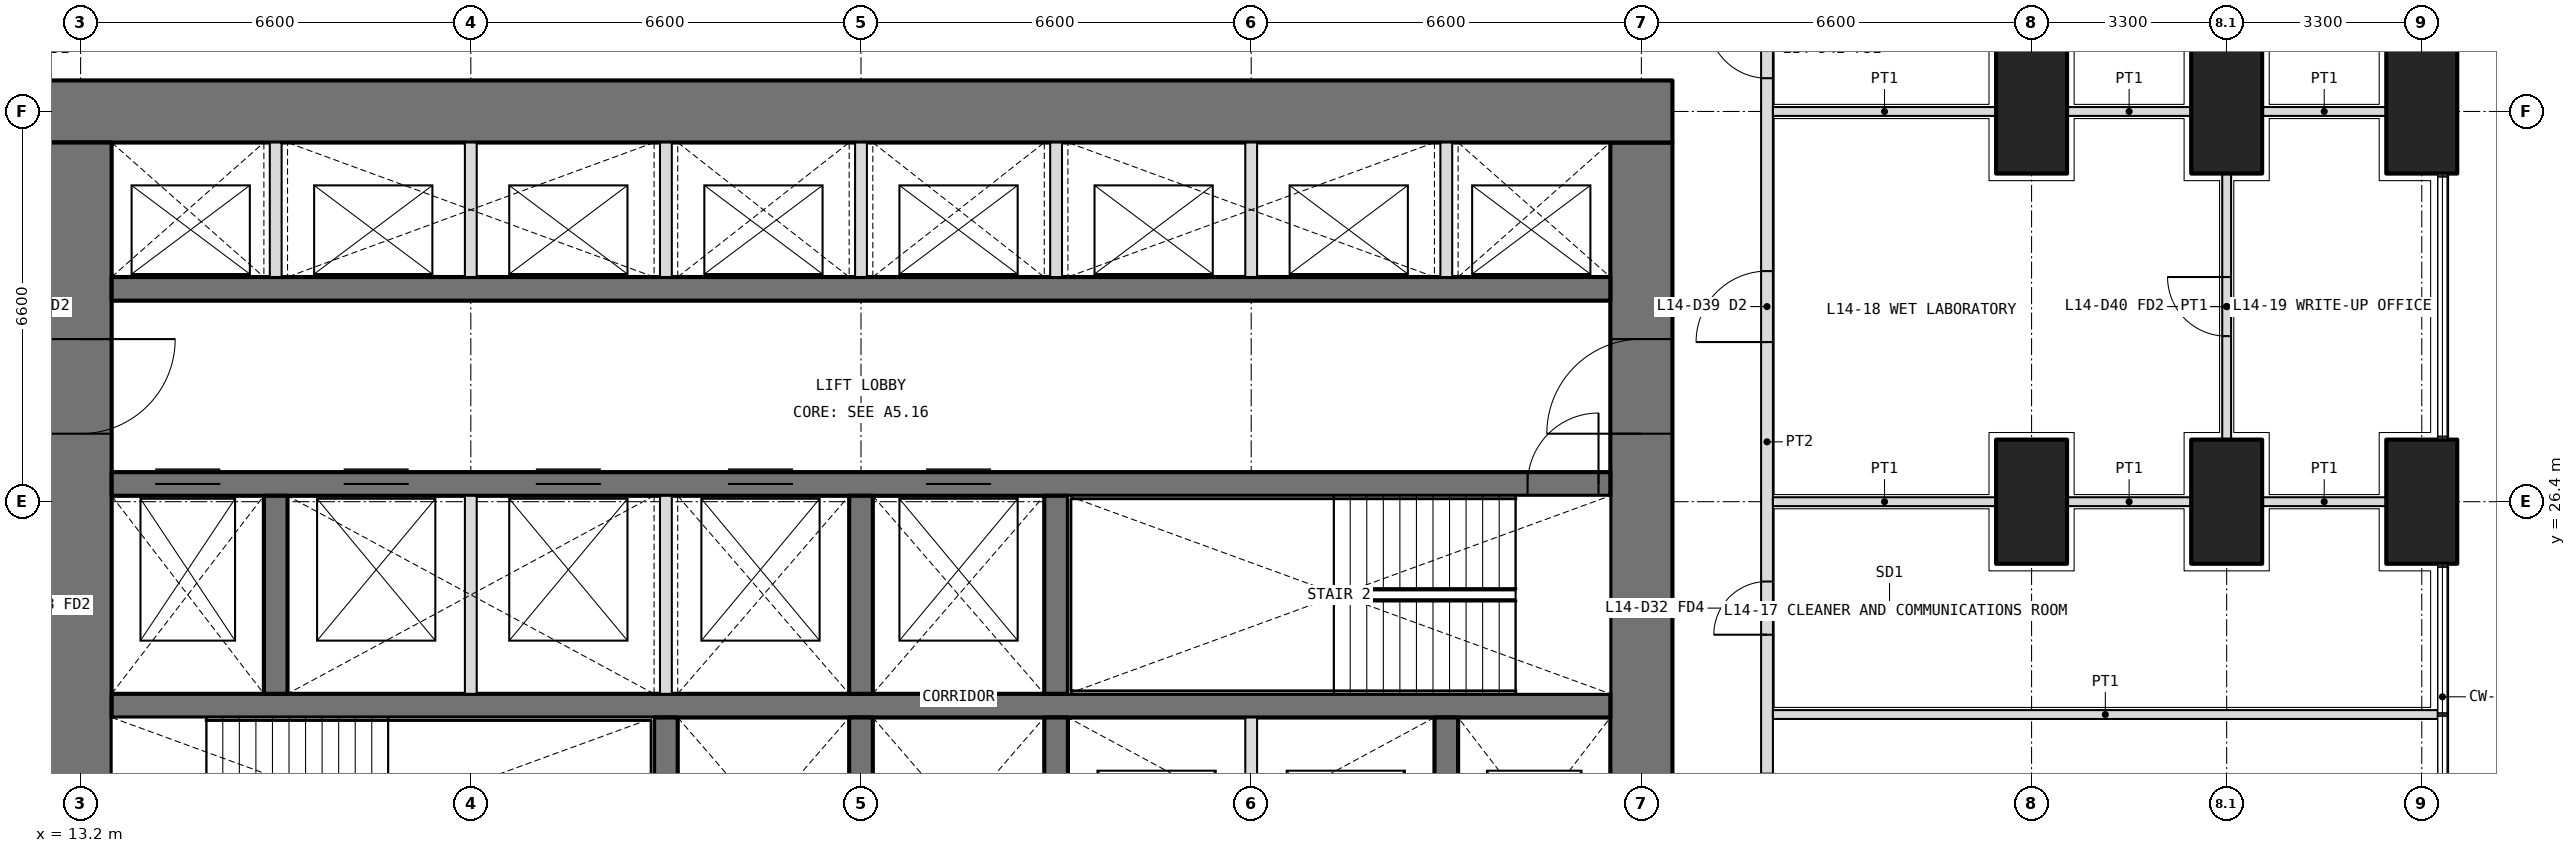
"""IFC4 building model, lengths in metres.
Left out: names, types, materials, properties, quantities, classifications, styles, units other than length and angle.
Written with IfcOpenShell. Run it as: python <this file> out.ifc"""

import sys

from ifc_helpers import new_model, si_unit, direction, frame, frame_2d, origin, origin_2d, place, context, subcontext, project, spatial, rectangle, extrude, element, fill, save


model = new_model("IFC4")
c1 = context("Model", 3, precision=1e-05, world=origin(), true_north=direction((0.0, 1.0)))
c2 = subcontext(c1, "Body", "Model", "MODEL_VIEW")
j1 = project(units=[si_unit("LENGTHUNIT", "METRE"), si_unit("PLANEANGLEUNIT", "RADIAN")], contexts=[c1])
p1 = place(None, origin())
s1 = spatial("IfcSite", under=j1, at=p1, CompositionType="ELEMENT")
p2 = place(p1, origin())
s2 = spatial("IfcBuilding", under=s1, at=p2, CompositionType="ELEMENT")
p3 = place(p2, frame((0.0, 0.0, 63.3)))
s3 = spatial("IfcBuildingStorey", under=s2, at=p3, CompositionType="ELEMENT", Elevation=63.3)
for number, where, z_axis, x_axis in (
    (1, (52.8, 26.4, 0.0), (0.0, 0.0, 1.0), (0.0, 1.0, 0.0)),
    (2, (52.8, 33.0, 0.0), (0.0, 0.0, 1.0), (0.0, 1.0, 0.0)),
    (3, (49.5, 26.4, 0.0), (0.0, 0.0, 1.0), (0.0, 1.0, 0.0)),
    (4, (49.5, 33.0, 0.0), (0.0, 0.0, 1.0), (0.0, 1.0, 0.0)),
    (5, (46.2, 26.4, 0.0), (0.0, 0.0, 1.0), (0.0, 1.0, 0.0)),
    (6, (46.2, 33.0, 0.0), (0.0, 0.0, 1.0), (0.0, 1.0, 0.0)),
):
    element("IfcColumn", number, at=place(p3, frame(where, z_axis=z_axis, x_axis=x_axis)), inside=s3, PredefinedType="COLUMN", context=c2, shape_type="SweptSolid", body=[
        extrude(rectangle(XDim=2.1, YDim=1.2, at=origin_2d()), origin(), (0.0, 0.0, 1.0), 4.2),
    ])
p4 = place(p3, frame((39.6, 13.725, 0.0), z_axis=(0.0, 0.0, 1.0), x_axis=(0.0, 1.0, 0.0)))
e7 = element("IfcWall", 7, at=p4, inside=s3, PredefinedType="SHEAR", context=c2, shape_type="SweptSolid", body=[
    extrude(rectangle(XDim=18.75, YDim=1.05, at=frame_2d((9.375, 0.0))), origin(), (0.0, 0.0, 1.0), 4.2),
])
p5 = place(p4, frame((3.025, 0.0, 0.0)))
e8 = element("IfcOpeningElement", 8, at=p5, cuts=e7, PredefinedType="OPENING", context=c2, shape_type="SweptSolid", body=[
    extrude(rectangle(XDim=1.6, YDim=2.1, at=frame_2d((0.8, 1.05))), frame((0.0, 0.535, 0.0), z_axis=(0.0, -1.0, 0.0), x_axis=(1.0, 0.0, 0.0)), (0.0, 0.0, 1.0), 1.07),
])
p6 = place(p4, frame((13.825, 0.0, 0.0)))
e9 = element("IfcOpeningElement", 9, at=p6, cuts=e7, PredefinedType="OPENING", context=c2, shape_type="SweptSolid", body=[
    extrude(rectangle(XDim=1.6, YDim=2.1, at=frame_2d((0.8, 1.05))), frame((0.0, 0.535, 0.0), z_axis=(0.0, -1.0, 0.0), x_axis=(1.0, 0.0, 0.0)), (0.0, 0.0, 1.0), 1.07),
])
p7 = place(p3, frame((40.125, 33.0, 0.0), z_axis=(0.0, 0.0, 1.0), x_axis=(-1.0, 0.0, 0.0)))
e10 = element("IfcWall", 10, at=p7, inside=s3, PredefinedType="SHEAR", context=c2, shape_type="SweptSolid", body=[
    extrude(rectangle(XDim=27.45, YDim=1.05, at=frame_2d((13.725, 0.0))), origin(), (0.0, 0.0, 1.0), 4.2),
])
p8 = place(p3, frame((13.2, 32.475, 0.0), z_axis=(0.0, 0.0, 1.0), x_axis=(0.0, -1.0, 0.0)))
e11 = element("IfcWall", 11, at=p8, inside=s3, PredefinedType="SHEAR", context=c2, shape_type="SweptSolid", body=[
    extrude(rectangle(XDim=18.75, YDim=1.05, at=frame_2d((9.375, 0.0))), origin(), (0.0, 0.0, 1.0), 4.2),
])
p9 = place(p8, frame((14.125, 0.0, 0.0)))
e12 = element("IfcOpeningElement", 12, at=p9, cuts=e11, PredefinedType="OPENING", context=c2, shape_type="SweptSolid", body=[
    extrude(rectangle(XDim=1.6, YDim=2.1, at=frame_2d((0.8, 1.05))), frame((0.0, 0.535, 0.0), z_axis=(0.0, -1.0, 0.0), x_axis=(1.0, 0.0, 0.0)), (0.0, 0.0, 1.0), 1.07),
])
p10 = place(p8, frame((3.325, 0.0, 0.0)))
e13 = element("IfcOpeningElement", 13, at=p10, cuts=e11, PredefinedType="OPENING", context=c2, shape_type="SweptSolid", body=[
    extrude(rectangle(XDim=1.6, YDim=2.1, at=frame_2d((0.8, 1.05))), frame((0.0, 0.535, 0.0), z_axis=(0.0, -1.0, 0.0), x_axis=(1.0, 0.0, 0.0)), (0.0, 0.0, 1.0), 1.07),
])
p11 = place(p3, frame((13.725, 22.95, 0.0), z_axis=(0.0, 0.0, 1.0), x_axis=(1.0, 0.0, 0.0)))
e14 = element("IfcWall", 14, at=p11, inside=s3, PredefinedType="SHEAR", context=c2, shape_type="SweptSolid", body=[
    extrude(rectangle(XDim=25.35, YDim=0.4, at=frame_2d((12.675, 0.0))), origin(), (0.0, 0.0, 1.0), 4.2),
])
p12 = place(p3, frame((13.725, 26.7, 0.0), z_axis=(0.0, 0.0, 1.0), x_axis=(1.0, 0.0, 0.0)))
e15 = element("IfcWall", 15, at=p12, inside=s3, PredefinedType="SHEAR", context=c2, shape_type="SweptSolid", body=[
    extrude(rectangle(XDim=25.35, YDim=0.4, at=frame_2d((12.675, 0.0))), origin(), (0.0, 0.0, 1.0), 4.2),
])
p13 = place(p12, frame((23.95, 0.0, 0.0)))
e16 = element("IfcOpeningElement", 16, at=p13, cuts=e15, PredefinedType="OPENING", context=c2, shape_type="SweptSolid", body=[
    extrude(rectangle(XDim=1.2, YDim=2.1, at=frame_2d((0.6, 1.05))), frame((0.0, 0.21, 0.0), z_axis=(0.0, -1.0, 0.0), x_axis=(1.0, 0.0, 0.0)), (0.0, 0.0, 1.0), 0.42),
])
p14 = place(p12, frame((0.738, 0.0, 0.0)))
e17 = element("IfcOpeningElement", 17, at=p14, cuts=e15, PredefinedType="OPENING", context=c2, shape_type="SweptSolid", body=[
    extrude(rectangle(XDim=1.1, YDim=2.1, at=frame_2d((0.55, 1.05))), frame((0.0, 0.21, 0.0), z_axis=(0.0, -1.0, 0.0), x_axis=(1.0, 0.0, 0.0)), (0.0, 0.0, 1.0), 0.42),
])
p15 = place(p12, frame((3.925, 0.0, 0.0)))
e18 = element("IfcOpeningElement", 18, at=p15, cuts=e15, PredefinedType="OPENING", context=c2, shape_type="SweptSolid", body=[
    extrude(rectangle(XDim=1.1, YDim=2.1, at=frame_2d((0.55, 1.05))), frame((0.0, 0.21, 0.0), z_axis=(0.0, -1.0, 0.0), x_axis=(1.0, 0.0, 0.0)), (0.0, 0.0, 1.0), 0.42),
])
p16 = place(p12, frame((7.175, 0.0, 0.0)))
e19 = element("IfcOpeningElement", 19, at=p16, cuts=e15, PredefinedType="OPENING", context=c2, shape_type="SweptSolid", body=[
    extrude(rectangle(XDim=1.1, YDim=2.1, at=frame_2d((0.55, 1.05))), frame((0.0, 0.21, 0.0), z_axis=(0.0, -1.0, 0.0), x_axis=(1.0, 0.0, 0.0)), (0.0, 0.0, 1.0), 0.42),
])
p17 = place(p12, frame((10.425, 0.0, 0.0)))
e20 = element("IfcOpeningElement", 20, at=p17, cuts=e15, PredefinedType="OPENING", context=c2, shape_type="SweptSolid", body=[
    extrude(rectangle(XDim=1.1, YDim=2.1, at=frame_2d((0.55, 1.05))), frame((0.0, 0.21, 0.0), z_axis=(0.0, -1.0, 0.0), x_axis=(1.0, 0.0, 0.0)), (0.0, 0.0, 1.0), 0.42),
])
p18 = place(p12, frame((13.775, 0.0, 0.0)))
e21 = element("IfcOpeningElement", 21, at=p18, cuts=e15, PredefinedType="OPENING", context=c2, shape_type="SweptSolid", body=[
    extrude(rectangle(XDim=1.1, YDim=2.1, at=frame_2d((0.55, 1.05))), frame((0.0, 0.21, 0.0), z_axis=(0.0, -1.0, 0.0), x_axis=(1.0, 0.0, 0.0)), (0.0, 0.0, 1.0), 0.42),
])
p19 = place(p3, frame((13.725, 30.0, 0.0), z_axis=(0.0, 0.0, 1.0), x_axis=(1.0, 0.0, 0.0)))
e22 = element("IfcWall", 22, at=p19, inside=s3, PredefinedType="SHEAR", context=c2, shape_type="SweptSolid", body=[
    extrude(rectangle(XDim=25.35, YDim=0.4, at=frame_2d((12.675, 0.0))), origin(), (0.0, 0.0, 1.0), 4.2),
])
for number, where, z_axis, x_axis in (
    (23, (23.1, 19.4, 0.0), (0.0, 0.0, 1.0), (0.0, 1.0, 0.0)),
    (24, (26.4, 19.4, 0.0), (0.0, 0.0, 1.0), (0.0, 1.0, 0.0)),
    (25, (29.7, 19.4, 0.0), (0.0, 0.0, 1.0), (0.0, 1.0, 0.0)),
    (26, (36.3, 19.4, 0.0), (0.0, 0.0, 1.0), (0.0, 1.0, 0.0)),
    (27, (16.5, 23.15, 0.0), (0.0, 0.0, 1.0), (0.0, 1.0, 0.0)),
    (28, (26.4, 23.15, 0.0), (0.0, 0.0, 1.0), (0.0, 1.0, 0.0)),
    (29, (29.7, 23.15, 0.0), (0.0, 0.0, 1.0), (0.0, 1.0, 0.0)),
):
    element("IfcWall", number, at=place(p3, frame(where, z_axis=z_axis, x_axis=x_axis)), inside=s3, PredefinedType="SHEAR", context=c2, shape_type="SweptSolid", body=[
        extrude(rectangle(XDim=3.35, YDim=0.4, at=frame_2d((1.675, 0.0))), origin(), (0.0, 0.0, 1.0), 4.2),
    ])
for number, where, z_axis, x_axis in (
    (30, (16.5, 30.2, 0.0), (0.0, 0.0, 1.0), (0.0, 1.0, 0.0)),
    (31, (19.8, 30.2, 0.0), (0.0, 0.0, 1.0), (0.0, 1.0, 0.0)),
    (32, (23.1, 30.2, 0.0), (0.0, 0.0, 1.0), (0.0, 1.0, 0.0)),
    (33, (26.4, 30.2, 0.0), (0.0, 0.0, 1.0), (0.0, 1.0, 0.0)),
    (34, (29.7, 30.2, 0.0), (0.0, 0.0, 1.0), (0.0, 1.0, 0.0)),
    (35, (33.0, 30.2, 0.0), (0.0, 0.0, 1.0), (0.0, 1.0, 0.0)),
    (36, (36.3, 30.2, 0.0), (0.0, 0.0, 1.0), (0.0, 1.0, 0.0)),
):
    element("IfcWall", number, at=place(p3, frame(where, z_axis=z_axis, x_axis=x_axis)), inside=s3, PredefinedType="PARTITIONING", context=c2, shape_type="SweptSolid", body=[
        extrude(rectangle(XDim=2.275, YDim=0.2, at=frame_2d((1.138, 0.0))), origin(), (0.0, 0.0, 1.0), 4.2),
    ])
for number, where, z_axis, x_axis in (
    (37, (33.0, 19.4, 0.0), (0.0, 0.0, 1.0), (0.0, 1.0, 0.0)),
    (38, (19.8, 23.15, 0.0), (0.0, 0.0, 1.0), (0.0, 1.0, 0.0)),
    (39, (23.1, 23.15, 0.0), (0.0, 0.0, 1.0), (0.0, 1.0, 0.0)),
):
    element("IfcWall", number, at=place(p3, frame(where, z_axis=z_axis, x_axis=x_axis)), inside=s3, PredefinedType="PARTITIONING", context=c2, shape_type="SweptSolid", body=[
        extrude(rectangle(XDim=3.35, YDim=0.2, at=frame_2d((1.675, 0.0))), origin(), (0.0, 0.0, 1.0), 4.2),
    ])
p20 = place(p3, frame((41.725, 19.8, 0.0), z_axis=(0.0, 0.0, 1.0), x_axis=(0.0, 1.0, 0.0)))
e40 = element("IfcWall", 40, at=p20, inside=s3, PredefinedType="PARTITIONING", context=c2, shape_type="SweptSolid", body=[
    extrude(rectangle(XDim=15.225, YDim=0.2, at=frame_2d((7.612, 0.0))), origin(), (0.0, 0.0, 1.0), 2.85),
])
p21 = place(p20, frame((1.0, 0.0, 0.0)))
e41 = element("IfcOpeningElement", 41, at=p21, cuts=e40, PredefinedType="OPENING", context=c2, shape_type="SweptSolid", body=[
    extrude(rectangle(XDim=1.0, YDim=2.1, at=frame_2d((0.5, 1.05))), frame((0.0, 0.11, 0.0), z_axis=(0.0, -1.0, 0.0), x_axis=(1.0, 0.0, 0.0)), (0.0, 0.0, 1.0), 0.22),
])
p22 = place(p20, frame((4.35, 0.0, 0.0)))
e42 = element("IfcOpeningElement", 42, at=p22, cuts=e40, PredefinedType="OPENING", context=c2, shape_type="SweptSolid", body=[
    extrude(rectangle(XDim=0.9, YDim=2.1, at=frame_2d((0.45, 1.05))), frame((0.0, 0.11, 0.0), z_axis=(0.0, -1.0, 0.0), x_axis=(1.0, 0.0, 0.0)), (0.0, 0.0, 1.0), 0.22),
])
p23 = place(p20, frame((9.3, 0.0, 0.0)))
e43 = element("IfcOpeningElement", 43, at=p23, cuts=e40, PredefinedType="OPENING", context=c2, shape_type="SweptSolid", body=[
    extrude(rectangle(XDim=1.2, YDim=2.1, at=frame_2d((0.6, 1.05))), frame((0.0, 0.11, 0.0), z_axis=(0.0, -1.0, 0.0), x_axis=(1.0, 0.0, 0.0)), (0.0, 0.0, 1.0), 0.22),
])
p24 = place(p20, frame((13.762, 0.0, 0.0)))
e44 = element("IfcOpeningElement", 44, at=p24, cuts=e40, PredefinedType="OPENING", context=c2, shape_type="SweptSolid", body=[
    extrude(rectangle(XDim=1.0, YDim=2.1, at=frame_2d((0.5, 1.05))), frame((0.0, 0.11, 0.0), z_axis=(0.0, -1.0, 0.0), x_axis=(1.0, 0.0, 0.0)), (0.0, 0.0, 1.0), 0.22),
])
p25 = place(p3, frame((49.5, 27.45, 0.0), z_axis=(0.0, 0.0, 1.0), x_axis=(0.0, 1.0, 0.0)))
e45 = element("IfcWall", 45, at=p25, inside=s3, PredefinedType="PARTITIONING", context=c2, shape_type="SweptSolid", body=[
    extrude(rectangle(XDim=4.5, YDim=0.15, at=frame_2d((2.25, 0.0))), origin(), (0.0, 0.0, 1.0), 3.9),
])
p26 = place(p25, frame((1.75, 0.0, 0.0)))
e46 = element("IfcOpeningElement", 46, at=p26, cuts=e45, PredefinedType="OPENING", context=c2, shape_type="SweptSolid", body=[
    extrude(rectangle(XDim=1.0, YDim=2.1, at=frame_2d((0.5, 1.05))), frame((0.0, 0.085, 0.0), z_axis=(0.0, -1.0, 0.0), x_axis=(1.0, 0.0, 0.0)), (0.0, 0.0, 1.0), 0.17),
])
p27 = place(p3, frame((53.07, 22.8, 0.0), z_axis=(0.0, 0.0, 1.0), x_axis=(-1.0, 0.0, 0.0)))
e47 = element("IfcWall", 47, at=p27, inside=s3, PredefinedType="PARTITIONING", context=c2, shape_type="SweptSolid", body=[
    extrude(rectangle(XDim=11.245, YDim=0.15, at=frame_2d((5.623, 0.0))), origin(), (0.0, 0.0, 1.0), 2.6),
])
for number, where, z_axis, x_axis in (
    (48, (52.2, 26.4, 0.0), (0.0, 0.0, 1.0), (-1.0, 0.0, 0.0)),
    (49, (48.9, 26.4, 0.0), (0.0, 0.0, 1.0), (-1.0, 0.0, 0.0)),
):
    element("IfcWall", number, at=place(p3, frame(where, z_axis=z_axis, x_axis=x_axis)), inside=s3, PredefinedType="PARTITIONING", context=c2, shape_type="SweptSolid", body=[
        extrude(rectangle(XDim=2.1, YDim=0.15, at=frame_2d((1.05, 0.0))), origin(), (0.0, 0.0, 1.0), 2.85),
    ])
p28 = place(p3, frame((45.6, 26.4, 0.0), z_axis=(0.0, 0.0, 1.0), x_axis=(-1.0, 0.0, 0.0)))
e50 = element("IfcWall", 50, at=p28, inside=s3, PredefinedType="PARTITIONING", context=c2, shape_type="SweptSolid", body=[
    extrude(rectangle(XDim=3.775, YDim=0.15, at=frame_2d((1.888, 0.0))), origin(), (0.0, 0.0, 1.0), 2.85),
])
for number, where, z_axis, x_axis in (
    (51, (52.2, 33.0, 0.0), (0.0, 0.0, 1.0), (-1.0, 0.0, 0.0)),
    (52, (48.9, 33.0, 0.0), (0.0, 0.0, 1.0), (-1.0, 0.0, 0.0)),
):
    element("IfcWall", number, at=place(p3, frame(where, z_axis=z_axis, x_axis=x_axis)), inside=s3, PredefinedType="PARTITIONING", context=c2, shape_type="SweptSolid", body=[
        extrude(rectangle(XDim=2.1, YDim=0.15, at=frame_2d((1.05, 0.0))), origin(), (0.0, 0.0, 1.0), 2.85),
    ])
p29 = place(p3, frame((45.6, 33.0, 0.0), z_axis=(0.0, 0.0, 1.0), x_axis=(-1.0, 0.0, 0.0)))
e53 = element("IfcWall", 53, at=p29, inside=s3, PredefinedType="PARTITIONING", context=c2, shape_type="SweptSolid", body=[
    extrude(rectangle(XDim=3.775, YDim=0.15, at=frame_2d((1.888, 0.0))), origin(), (0.0, 0.0, 1.0), 2.85),
])
p30 = place(p22, origin())
e54 = element("IfcDoor", 54, at=p30, inside=s3, OperationType="SINGLE_SWING_LEFT", PredefinedType="DOOR", context=c2, shape_type="SweptSolid", body=[
    extrude(rectangle(XDim=0.9, YDim=2.1, at=frame_2d((0.45, 1.05))), frame((0.0, 0.025, 0.0), z_axis=(0.0, -1.0, 0.0), x_axis=(1.0, 0.0, 0.0)), (0.0, 0.0, 1.0), 0.05),
])
fill(e42, e54)
p31 = place(p23, origin())
e55 = element("IfcDoor", 55, at=p31, inside=s3, OperationType="DOUBLE_DOOR_SINGLE_SWING", PredefinedType="DOOR", context=c2, shape_type="SweptSolid", body=[
    extrude(rectangle(XDim=1.2, YDim=2.1, at=frame_2d((0.6, 1.05))), frame((0.0, 0.025, 0.0), z_axis=(0.0, -1.0, 0.0), x_axis=(1.0, 0.0, 0.0)), (0.0, 0.0, 1.0), 0.05),
])
fill(e43, e55)
p32 = place(p26, origin())
e56 = element("IfcDoor", 56, at=p32, inside=s3, OperationType="SINGLE_SWING_RIGHT", PredefinedType="DOOR", context=c2, shape_type="SweptSolid", body=[
    extrude(rectangle(XDim=1.0, YDim=2.1, at=frame_2d((0.5, 1.05))), frame((0.0, 0.025, 0.0), z_axis=(0.0, -1.0, 0.0), x_axis=(1.0, 0.0, 0.0)), (0.0, 0.0, 1.0), 0.05),
])
fill(e46, e56)
p33 = place(p24, origin())
e57 = element("IfcDoor", 57, at=p33, inside=s3, OperationType="SINGLE_SWING_RIGHT", PredefinedType="DOOR", context=c2, shape_type="SweptSolid", body=[
    extrude(rectangle(XDim=1.0, YDim=2.1, at=frame_2d((0.5, 1.05))), frame((0.0, 0.025, 0.0), z_axis=(0.0, -1.0, 0.0), x_axis=(1.0, 0.0, 0.0)), (0.0, 0.0, 1.0), 0.05),
])
fill(e44, e57)
p34 = place(p13, origin())
e58 = element("IfcDoor", 58, at=p34, inside=s3, OperationType="SINGLE_SWING_RIGHT", PredefinedType="DOOR", context=c2, shape_type="SweptSolid", body=[
    extrude(rectangle(XDim=1.2, YDim=2.1, at=frame_2d((0.6, 1.05))), frame((0.0, 0.025, 0.0), z_axis=(0.0, -1.0, 0.0), x_axis=(1.0, 0.0, 0.0)), (0.0, 0.0, 1.0), 0.05),
])
fill(e16, e58)
p35 = place(p10, origin())
e59 = element("IfcDoor", 59, at=p35, inside=s3, OperationType="DOUBLE_DOOR_DOUBLE_SWING", PredefinedType="DOOR", context=c2, shape_type="SweptSolid", body=[
    extrude(rectangle(XDim=1.6, YDim=2.1, at=frame_2d((0.8, 1.05))), frame((0.0, 0.025, 0.0), z_axis=(0.0, -1.0, 0.0), x_axis=(1.0, 0.0, 0.0)), (0.0, 0.0, 1.0), 0.05),
])
fill(e13, e59)
p36 = place(p6, origin())
e60 = element("IfcDoor", 60, at=p36, inside=s3, OperationType="DOUBLE_DOOR_DOUBLE_SWING", PredefinedType="DOOR", context=c2, shape_type="SweptSolid", body=[
    extrude(rectangle(XDim=1.6, YDim=2.1, at=frame_2d((0.8, 1.05))), frame((0.0, 0.025, 0.0), z_axis=(0.0, -1.0, 0.0), x_axis=(1.0, 0.0, 0.0)), (0.0, 0.0, 1.0), 0.05),
])
fill(e9, e60)
p37 = place(p14, origin())
e61 = element("IfcDoor", 61, at=p37, inside=s3, OperationType="DOUBLE_DOOR_SLIDING", PredefinedType="DOOR", context=c2, shape_type="SweptSolid", body=[
    extrude(rectangle(XDim=1.1, YDim=2.1, at=frame_2d((0.55, 1.05))), frame((0.0, 0.025, 0.0), z_axis=(0.0, -1.0, 0.0), x_axis=(1.0, 0.0, 0.0)), (0.0, 0.0, 1.0), 0.05),
])
fill(e17, e61)
p38 = place(p15, origin())
e62 = element("IfcDoor", 62, at=p38, inside=s3, OperationType="DOUBLE_DOOR_SLIDING", PredefinedType="DOOR", context=c2, shape_type="SweptSolid", body=[
    extrude(rectangle(XDim=1.1, YDim=2.1, at=frame_2d((0.55, 1.05))), frame((0.0, 0.025, 0.0), z_axis=(0.0, -1.0, 0.0), x_axis=(1.0, 0.0, 0.0)), (0.0, 0.0, 1.0), 0.05),
])
fill(e18, e62)
p39 = place(p16, origin())
e63 = element("IfcDoor", 63, at=p39, inside=s3, OperationType="DOUBLE_DOOR_SLIDING", PredefinedType="DOOR", context=c2, shape_type="SweptSolid", body=[
    extrude(rectangle(XDim=1.1, YDim=2.1, at=frame_2d((0.55, 1.05))), frame((0.0, 0.025, 0.0), z_axis=(0.0, -1.0, 0.0), x_axis=(1.0, 0.0, 0.0)), (0.0, 0.0, 1.0), 0.05),
])
fill(e19, e63)
p40 = place(p17, origin())
e64 = element("IfcDoor", 64, at=p40, inside=s3, OperationType="DOUBLE_DOOR_SLIDING", PredefinedType="DOOR", context=c2, shape_type="SweptSolid", body=[
    extrude(rectangle(XDim=1.1, YDim=2.1, at=frame_2d((0.55, 1.05))), frame((0.0, 0.025, 0.0), z_axis=(0.0, -1.0, 0.0), x_axis=(1.0, 0.0, 0.0)), (0.0, 0.0, 1.0), 0.05),
])
fill(e20, e64)
p41 = place(p18, origin())
e65 = element("IfcDoor", 65, at=p41, inside=s3, OperationType="DOUBLE_DOOR_SLIDING", PredefinedType="DOOR", context=c2, shape_type="SweptSolid", body=[
    extrude(rectangle(XDim=1.1, YDim=2.1, at=frame_2d((0.55, 1.05))), frame((0.0, 0.025, 0.0), z_axis=(0.0, -1.0, 0.0), x_axis=(1.0, 0.0, 0.0)), (0.0, 0.0, 1.0), 0.05),
])
fill(e21, e65)
save(model, sys.argv[1])
